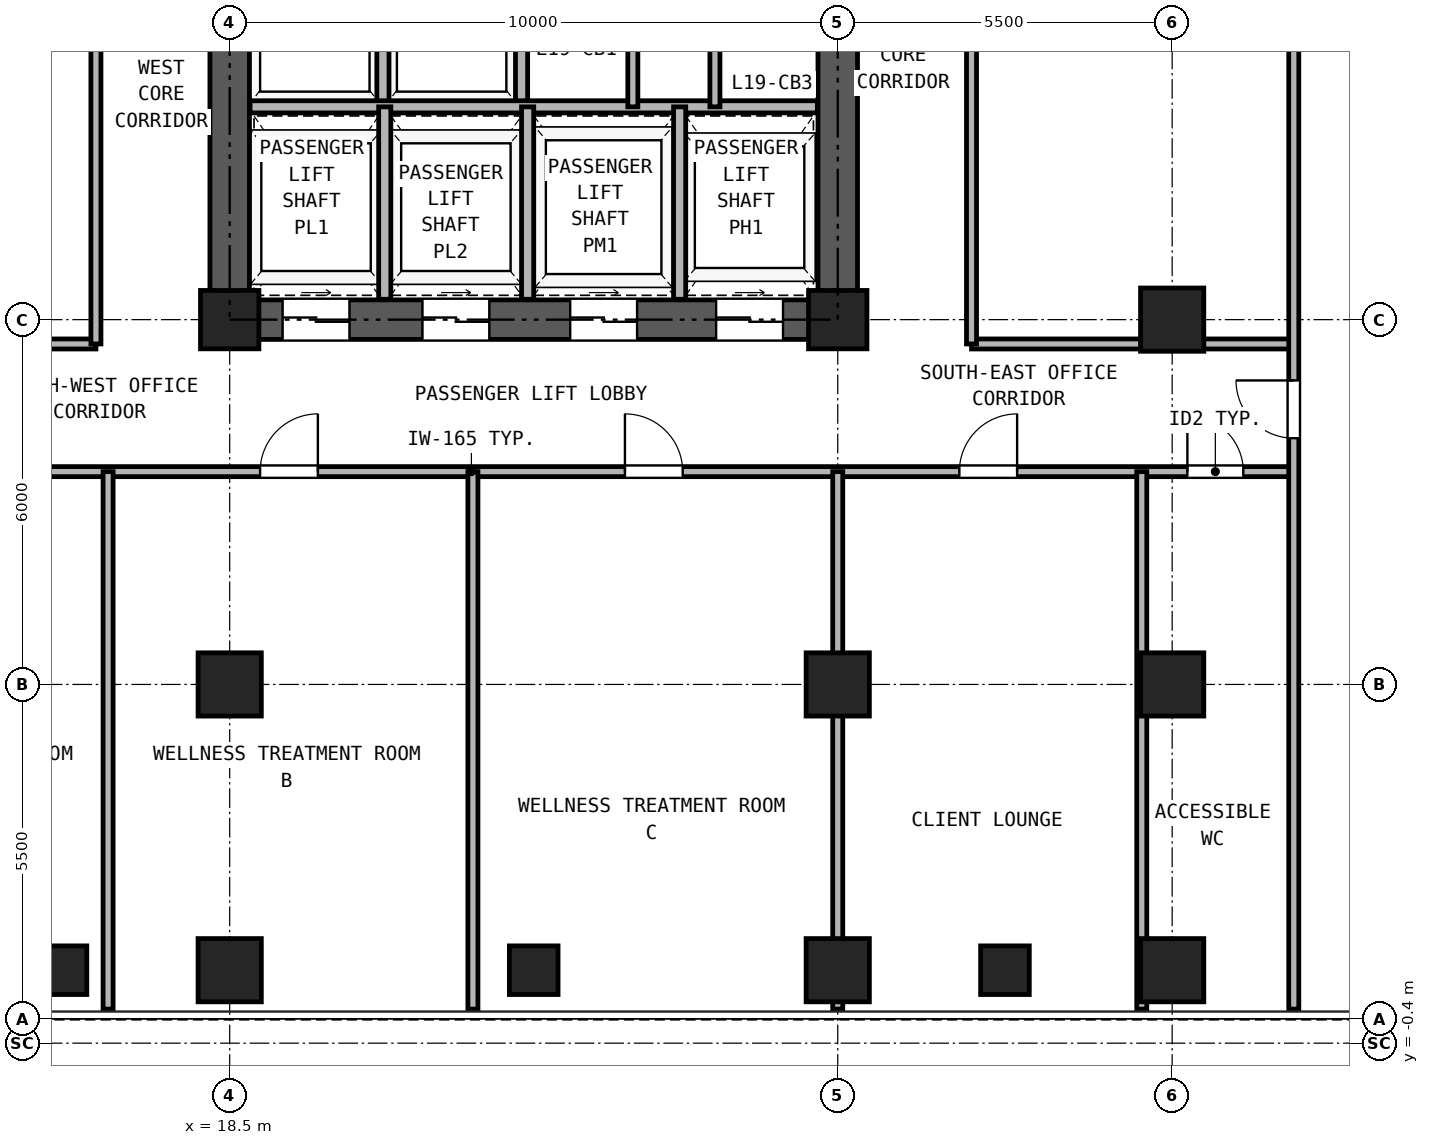
"""IFC4 building model, lengths in metres.
Left out: names, types, materials, properties, quantities, classifications, styles, units other than length and angle.
Written with IfcOpenShell. Run it as: python <this file> out.ifc"""

import sys

from ifc_helpers import new_model, si_unit, direction, frame, frame_2d, origin, origin_2d, place, context, subcontext, project, spatial, rectangle, hollow_rectangle, extrude, source, transform, mapped, element, fill, save


model = new_model("IFC4")
c1 = context("Model", 3, precision=1e-05, world=origin(), true_north=direction((0.0, 1.0)))
c2 = subcontext(c1, "Body", "Model", "MODEL_VIEW")
j1 = project(units=[si_unit("LENGTHUNIT", "METRE"), si_unit("PLANEANGLEUNIT", "RADIAN")], contexts=[c1])
p1 = place(None, origin())
s1 = spatial("IfcSite", under=j1, at=p1, CompositionType="ELEMENT")
p2 = place(p1, origin())
s2 = spatial("IfcBuilding", under=s1, at=p2, CompositionType="ELEMENT")
p3 = place(p2, frame((0.0, 0.0, 72.9)))
s3 = spatial("IfcBuildingStorey", under=s2, at=p3, CompositionType="ELEMENT", Elevation=72.9)
m1 = source(origin(), c2, "Body", "SweptSolid", [
    extrude(hollow_rectangle(XDim=1.04, YDim=1.04, WallThickness=0.065, at=origin_2d()), origin(), (0.0, 0.0, 1.0), 3.24),
])
for number, where, z_axis, x_axis in (
    (1, (18.5, 0.8, 0.0), (0.0, 0.0, 1.0), (1.0, 0.0, 0.0)),
    (2, (28.5, 0.8, 0.0), (0.0, 0.0, 1.0), (1.0, 0.0, 0.0)),
    (3, (34.0, 0.8, 0.0), (0.0, 0.0, 1.0), (1.0, 0.0, 0.0)),
    (4, (18.5, 5.5, 0.0), (0.0, 0.0, 1.0), (1.0, 0.0, 0.0)),
):
    element("IfcColumn", number, at=place(p3, frame(where, z_axis=z_axis, x_axis=x_axis)), inside=s3, PredefinedType="COLUMN", context=c2, shape_type="MappedRepresentation", body=[
        mapped(m1, transform((0.0, 0.0, 0.0), x_axis=(1.0, 0.0, 0.0), y_axis=(0.0, 1.0, 0.0), z_axis=(0.0, 0.0, 1.0), scale=1.0)),
    ])
m2 = source(origin(), c2, "Body", "SweptSolid", [
    extrude(hollow_rectangle(XDim=0.96, YDim=0.96, WallThickness=0.06, at=origin_2d()), origin(), (0.0, 0.0, 1.0), 3.24),
])
p4 = place(p3, frame((18.5, 11.5, 0.0), z_axis=(0.0, 0.0, 1.0), x_axis=(1.0, 0.0, 0.0)))
e5 = element("IfcColumn", 5, at=p4, inside=s3, PredefinedType="COLUMN", context=c2, shape_type="MappedRepresentation", body=[
    mapped(m2, transform((0.0, 0.0, 0.0), x_axis=(1.0, 0.0, 0.0), y_axis=(0.0, 1.0, 0.0), z_axis=(0.0, 0.0, 1.0), scale=1.0)),
])
p5 = place(p3, frame((28.5, 5.5, 0.0), z_axis=(0.0, 0.0, 1.0), x_axis=(1.0, 0.0, 0.0)))
e6 = element("IfcColumn", 6, at=p5, inside=s3, PredefinedType="COLUMN", context=c2, shape_type="MappedRepresentation", body=[
    mapped(m1, transform((0.0, 0.0, 0.0), x_axis=(1.0, 0.0, 0.0), y_axis=(0.0, 1.0, 0.0), z_axis=(0.0, 0.0, 1.0), scale=1.0)),
])
p6 = place(p3, frame((28.5, 11.5, 0.0), z_axis=(0.0, 0.0, 1.0), x_axis=(1.0, 0.0, 0.0)))
e7 = element("IfcColumn", 7, at=p6, inside=s3, PredefinedType="COLUMN", context=c2, shape_type="MappedRepresentation", body=[
    mapped(m2, transform((0.0, 0.0, 0.0), x_axis=(1.0, 0.0, 0.0), y_axis=(0.0, 1.0, 0.0), z_axis=(0.0, 0.0, 1.0), scale=1.0)),
])
for number, where, z_axis, x_axis in (
    (8, (34.0, 5.5, 0.0), (0.0, 0.0, 1.0), (1.0, 0.0, 0.0)),
    (9, (34.0, 11.5, 0.0), (0.0, 0.0, 1.0), (1.0, 0.0, 0.0)),
):
    element("IfcColumn", number, at=place(p3, frame(where, z_axis=z_axis, x_axis=x_axis)), inside=s3, PredefinedType="COLUMN", context=c2, shape_type="MappedRepresentation", body=[
        mapped(m1, transform((0.0, 0.0, 0.0), x_axis=(1.0, 0.0, 0.0), y_axis=(0.0, 1.0, 0.0), z_axis=(0.0, 0.0, 1.0), scale=1.0)),
    ])
m3 = source(origin(), c2, "Body", "SweptSolid", [
    extrude(hollow_rectangle(XDim=0.8, YDim=0.8, WallThickness=0.045, at=origin_2d()), origin(), (0.0, 0.0, 1.0), 3.24),
])
for number, where, z_axis, x_axis in (
    (10, (15.75, 0.8, 0.0), (0.0, 0.0, 1.0), (1.0, 0.0, 0.0)),
    (11, (23.5, 0.8, 0.0), (0.0, 0.0, 1.0), (1.0, 0.0, 0.0)),
    (12, (31.25, 0.8, 0.0), (0.0, 0.0, 1.0), (1.0, 0.0, 0.0)),
):
    element("IfcColumn", number, at=place(p3, frame(where, z_axis=z_axis, x_axis=x_axis)), inside=s3, PredefinedType="COLUMN", context=c2, shape_type="MappedRepresentation", body=[
        mapped(m3, transform((0.0, 0.0, 0.0), x_axis=(1.0, 0.0, 0.0), y_axis=(0.0, 1.0, 0.0), z_axis=(0.0, 0.0, 1.0), scale=1.0)),
    ])
p7 = place(p3, frame((18.175, 11.5, 0.0), z_axis=(0.0, 0.0, 1.0), x_axis=(1.0, 0.0, 0.0)))
e13 = element("IfcWall", 13, at=p7, inside=s3, PredefinedType="SHEAR", context=c2, shape_type="SweptSolid", body=[
    extrude(rectangle(XDim=10.65, YDim=0.65, at=frame_2d((5.325, 0.0))), origin(), (0.0, 0.0, 1.0), 3.24),
])
p8 = place(p7, frame((1.195, 0.0, 0.0)))
e14 = element("IfcOpeningElement", 14, at=p8, cuts=e13, PredefinedType="OPENING", context=c2, shape_type="SweptSolid", body=[
    extrude(rectangle(XDim=1.1, YDim=2.25, at=frame_2d((0.55, 1.125))), frame((0.0, 0.335, 0.0), z_axis=(0.0, -1.0, 0.0), x_axis=(1.0, 0.0, 0.0)), (0.0, 0.0, 1.0), 0.67),
])
p9 = place(p7, frame((3.495, 0.0, 0.0)))
e15 = element("IfcOpeningElement", 15, at=p9, cuts=e13, PredefinedType="OPENING", context=c2, shape_type="SweptSolid", body=[
    extrude(rectangle(XDim=1.1, YDim=2.25, at=frame_2d((0.55, 1.125))), frame((0.0, 0.335, 0.0), z_axis=(0.0, -1.0, 0.0), x_axis=(1.0, 0.0, 0.0)), (0.0, 0.0, 1.0), 0.67),
])
p10 = place(p7, frame((5.925, 0.0, 0.0)))
e16 = element("IfcOpeningElement", 16, at=p10, cuts=e13, PredefinedType="OPENING", context=c2, shape_type="SweptSolid", body=[
    extrude(rectangle(XDim=1.1, YDim=2.25, at=frame_2d((0.55, 1.125))), frame((0.0, 0.335, 0.0), z_axis=(0.0, -1.0, 0.0), x_axis=(1.0, 0.0, 0.0)), (0.0, 0.0, 1.0), 0.67),
])
p11 = place(p7, frame((8.325, 0.0, 0.0)))
e17 = element("IfcOpeningElement", 17, at=p11, cuts=e13, PredefinedType="OPENING", context=c2, shape_type="SweptSolid", body=[
    extrude(rectangle(XDim=1.1, YDim=2.25, at=frame_2d((0.55, 1.125))), frame((0.0, 0.335, 0.0), z_axis=(0.0, -1.0, 0.0), x_axis=(1.0, 0.0, 0.0)), (0.0, 0.0, 1.0), 0.67),
])
p12 = place(p3, frame((18.5, 11.825, 0.0), z_axis=(0.0, 0.0, 1.0), x_axis=(0.0, 1.0, 0.0)))
e18 = element("IfcWall", 18, at=p12, inside=s3, PredefinedType="SHEAR", context=c2, shape_type="SweptSolid", body=[
    extrude(rectangle(XDim=16.6, YDim=0.65, at=frame_2d((8.3, 0.0))), origin(), (0.0, 0.0, 1.0), 3.24),
])
p13 = place(p12, frame((7.325, 0.0, 0.0)))
e19 = element("IfcOpeningElement", 19, at=p13, cuts=e18, PredefinedType="OPENING", context=c2, shape_type="SweptSolid", body=[
    extrude(rectangle(XDim=1.15, YDim=2.2, at=frame_2d((0.575, 1.1))), frame((0.0, 0.335, 0.0), z_axis=(0.0, -1.0, 0.0), x_axis=(1.0, 0.0, 0.0)), (0.0, 0.0, 1.0), 0.67),
])
p14 = place(p3, frame((28.5, 11.825, 0.0), z_axis=(0.0, 0.0, 1.0), x_axis=(0.0, 1.0, 0.0)))
e20 = element("IfcWall", 20, at=p14, inside=s3, PredefinedType="SHEAR", context=c2, shape_type="SweptSolid", body=[
    extrude(rectangle(XDim=16.6, YDim=0.65, at=frame_2d((8.3, 0.0))), origin(), (0.0, 0.0, 1.0), 3.24),
])
p15 = place(p14, frame((7.325, 0.0, 0.0)))
e21 = element("IfcOpeningElement", 21, at=p15, cuts=e20, PredefinedType="OPENING", context=c2, shape_type="SweptSolid", body=[
    extrude(rectangle(XDim=1.15, YDim=2.2, at=frame_2d((0.575, 1.1))), frame((0.0, 0.335, 0.0), z_axis=(0.0, -1.0, 0.0), x_axis=(1.0, 0.0, 0.0)), (0.0, 0.0, 1.0), 0.67),
])
for number, where, z_axis, x_axis in (
    (22, (21.02, 15.0, 0.0), (0.0, 0.0, 1.0), (0.0, 1.0, 0.0)),
    (23, (23.3, 15.0, 0.0), (0.0, 0.0, 1.0), (0.0, 1.0, 0.0)),
):
    element("IfcWall", number, at=place(p3, frame(where, z_axis=z_axis, x_axis=x_axis)), inside=s3, PredefinedType="PARTITIONING", context=c2, shape_type="SweptSolid", body=[
        extrude(rectangle(XDim=3.0, YDim=0.2, at=frame_2d((1.5, 0.0))), origin(), (0.0, 0.0, 1.0), 3.24),
    ])
p16 = place(p3, frame((18.835, 15.0, 0.0), z_axis=(0.0, 0.0, 1.0), x_axis=(1.0, 0.0, 0.0)))
e24 = element("IfcWall", 24, at=p16, inside=s3, PredefinedType="PARTITIONING", context=c2, shape_type="SweptSolid", body=[
    extrude(rectangle(XDim=9.33, YDim=0.2, at=frame_2d((4.665, 0.0))), origin(), (0.0, 0.0, 1.0), 3.24),
])
p17 = place(p3, frame((25.13, 15.0, 0.0), z_axis=(0.0, 0.0, 1.0), x_axis=(0.0, 1.0, 0.0)))
e25 = element("IfcWall", 25, at=p17, inside=s3, PredefinedType="PARTITIONING", context=c2, shape_type="SweptSolid", body=[
    extrude(rectangle(XDim=3.0, YDim=0.165, at=frame_2d((1.5, 0.0))), origin(), (0.0, 0.0, 1.0), 3.24),
])
p18 = place(p3, frame((26.48, 15.0, 0.0), z_axis=(0.0, 0.0, 1.0), x_axis=(0.0, 1.0, 0.0)))
e26 = element("IfcWall", 26, at=p18, inside=s3, PredefinedType="PARTITIONING", context=c2, shape_type="SweptSolid", body=[
    extrude(rectangle(XDim=3.0, YDim=0.165, at=frame_2d((1.5, 0.0))), origin(), (0.0, 0.0, 1.0), 3.24),
])
p19 = place(p18, frame((1.05, 0.0, 0.0)))
e27 = element("IfcOpeningElement", 27, at=p19, cuts=e26, PredefinedType="OPENING", context=c2, shape_type="SweptSolid", body=[
    extrude(rectangle(XDim=0.9, YDim=2.05, at=frame_2d((0.45, 1.025))), frame((0.0, 0.093, 0.0), z_axis=(0.0, -1.0, 0.0), x_axis=(1.0, 0.0, 0.0)), (0.0, 0.0, 1.0), 0.185),
])
for number, where, z_axis, x_axis in (
    (28, (21.05, 11.835, 0.0), (0.0, 0.0, 1.0), (0.0, 1.0, 0.0)),
    (29, (23.4, 11.835, 0.0), (0.0, 0.0, 1.0), (0.0, 1.0, 0.0)),
    (30, (25.9, 11.835, 0.0), (0.0, 0.0, 1.0), (0.0, 1.0, 0.0)),
):
    element("IfcWall", number, at=place(p3, frame(where, z_axis=z_axis, x_axis=x_axis)), inside=s3, PredefinedType="PARTITIONING", context=c2, shape_type="SweptSolid", body=[
        extrude(rectangle(XDim=3.165, YDim=0.2, at=frame_2d((1.583, 0.0))), origin(), (0.0, 0.0, 1.0), 3.24),
    ])
p20 = place(p3, frame((11.0, 9.0, 0.0), z_axis=(0.0, 0.0, 1.0), x_axis=(1.0, 0.0, 0.0)))
e31 = element("IfcWall", 31, at=p20, inside=s3, PredefinedType="PARTITIONING", context=c2, shape_type="SweptSolid", body=[
    extrude(rectangle(XDim=25.0, YDim=0.165, at=frame_2d((12.5, 0.0))), origin(), (0.0, 0.0, 1.0), 3.24),
])
p21 = place(p20, frame((2.25, 0.0, 0.0)))
e32 = element("IfcOpeningElement", 32, at=p21, cuts=e31, PredefinedType="OPENING", context=c2, shape_type="SweptSolid", body=[
    extrude(rectangle(XDim=0.95, YDim=2.15, at=frame_2d((0.475, 1.075))), frame((0.0, 0.093, 0.0), z_axis=(0.0, -1.0, 0.0), x_axis=(1.0, 0.0, 0.0)), (0.0, 0.0, 1.0), 0.185),
])
p22 = place(p20, frame((8.0, 0.0, 0.0)))
e33 = element("IfcOpeningElement", 33, at=p22, cuts=e31, PredefinedType="OPENING", context=c2, shape_type="SweptSolid", body=[
    extrude(rectangle(XDim=0.95, YDim=2.15, at=frame_2d((0.475, 1.075))), frame((0.0, 0.093, 0.0), z_axis=(0.0, -1.0, 0.0), x_axis=(1.0, 0.0, 0.0)), (0.0, 0.0, 1.0), 0.185),
])
p23 = place(p20, frame((14.0, 0.0, 0.0)))
e34 = element("IfcOpeningElement", 34, at=p23, cuts=e31, PredefinedType="OPENING", context=c2, shape_type="SweptSolid", body=[
    extrude(rectangle(XDim=0.95, YDim=2.15, at=frame_2d((0.475, 1.075))), frame((0.0, 0.093, 0.0), z_axis=(0.0, -1.0, 0.0), x_axis=(1.0, 0.0, 0.0)), (0.0, 0.0, 1.0), 0.185),
])
p24 = place(p20, frame((19.5, 0.0, 0.0)))
e35 = element("IfcOpeningElement", 35, at=p24, cuts=e31, PredefinedType="OPENING", context=c2, shape_type="SweptSolid", body=[
    extrude(rectangle(XDim=0.95, YDim=2.15, at=frame_2d((0.475, 1.075))), frame((0.0, 0.093, 0.0), z_axis=(0.0, -1.0, 0.0), x_axis=(1.0, 0.0, 0.0)), (0.0, 0.0, 1.0), 0.185),
])
p25 = place(p20, frame((23.25, 0.0, 0.0)))
e36 = element("IfcOpeningElement", 36, at=p25, cuts=e31, PredefinedType="OPENING", context=c2, shape_type="SweptSolid", body=[
    extrude(rectangle(XDim=0.92, YDim=2.1, at=frame_2d((0.46, 1.05))), frame((0.0, 0.093, 0.0), z_axis=(0.0, -1.0, 0.0), x_axis=(1.0, 0.0, 0.0)), (0.0, 0.0, 1.0), 0.185),
])
for number, where, z_axis, x_axis in (
    (37, (11.0, 11.1, 0.0), (0.0, 0.0, 1.0), (1.0, 0.0, 0.0)),
    (38, (30.7, 11.1, 0.0), (0.0, 0.0, 1.0), (1.0, 0.0, 0.0)),
):
    element("IfcWall", number, at=place(p3, frame(where, z_axis=z_axis, x_axis=x_axis)), inside=s3, PredefinedType="PARTITIONING", context=c2, shape_type="SweptSolid", body=[
        extrude(rectangle(XDim=5.3, YDim=0.165, at=frame_2d((2.65, 0.0))), origin(), (0.0, 0.0, 1.0), 3.24),
    ])
p26 = place(p3, frame((16.3, 11.1, 0.0), z_axis=(0.0, 0.0, 1.0), x_axis=(0.0, 1.0, 0.0)))
e39 = element("IfcWall", 39, at=p26, inside=s3, PredefinedType="PARTITIONING", context=c2, shape_type="SweptSolid", body=[
    extrude(rectangle(XDim=18.1, YDim=0.165, at=frame_2d((9.05, 0.0))), origin(), (0.0, 0.0, 1.0), 3.24),
])
p27 = place(p26, frame((5.363, 0.0, 0.0)))
e40 = element("IfcOpeningElement", 40, at=p27, cuts=e39, PredefinedType="OPENING", context=c2, shape_type="SweptSolid", body=[
    extrude(rectangle(XDim=0.95, YDim=2.15, at=frame_2d((0.475, 1.075))), frame((0.0, 0.093, 0.0), z_axis=(0.0, -1.0, 0.0), x_axis=(1.0, 0.0, 0.0)), (0.0, 0.0, 1.0), 0.185),
])
p28 = place(p26, frame((14.413, 0.0, 0.0)))
e41 = element("IfcOpeningElement", 41, at=p28, cuts=e39, PredefinedType="OPENING", context=c2, shape_type="SweptSolid", body=[
    extrude(rectangle(XDim=0.95, YDim=2.15, at=frame_2d((0.475, 1.075))), frame((0.0, 0.093, 0.0), z_axis=(0.0, -1.0, 0.0), x_axis=(1.0, 0.0, 0.0)), (0.0, 0.0, 1.0), 0.185),
])
p29 = place(p3, frame((30.7, 11.1, 0.0), z_axis=(0.0, 0.0, 1.0), x_axis=(0.0, 1.0, 0.0)))
e42 = element("IfcWall", 42, at=p29, inside=s3, PredefinedType="PARTITIONING", context=c2, shape_type="SweptSolid", body=[
    extrude(rectangle(XDim=18.1, YDim=0.165, at=frame_2d((9.05, 0.0))), origin(), (0.0, 0.0, 1.0), 3.24),
])
p30 = place(p29, frame((8.55, 0.0, 0.0)))
e43 = element("IfcOpeningElement", 43, at=p30, cuts=e42, PredefinedType="OPENING", context=c2, shape_type="SweptSolid", body=[
    extrude(rectangle(XDim=0.95, YDim=2.15, at=frame_2d((0.475, 1.075))), frame((0.0, 0.093, 0.0), z_axis=(0.0, -1.0, 0.0), x_axis=(1.0, 0.0, 0.0)), (0.0, 0.0, 1.0), 0.185),
])
p31 = place(p3, frame((36.0, 0.16, 0.0), z_axis=(0.0, 0.0, 1.0), x_axis=(0.0, 1.0, 0.0)))
e44 = element("IfcWall", 44, at=p31, inside=s3, PredefinedType="PARTITIONING", context=c2, shape_type="SweptSolid", body=[
    extrude(rectangle(XDim=40.18, YDim=0.165, at=frame_2d((20.09, 0.0))), origin(), (0.0, 0.0, 1.0), 3.24),
])
p32 = place(p31, frame((9.39, 0.0, 0.0)))
e45 = element("IfcOpeningElement", 45, at=p32, cuts=e44, PredefinedType="OPENING", context=c2, shape_type="SweptSolid", body=[
    extrude(rectangle(XDim=0.95, YDim=2.15, at=frame_2d((0.475, 1.075))), frame((0.0, 0.093, 0.0), z_axis=(0.0, -1.0, 0.0), x_axis=(1.0, 0.0, 0.0)), (0.0, 0.0, 1.0), 0.185),
])
p33 = place(p31, frame((29.59, 0.0, 0.0)))
e46 = element("IfcOpeningElement", 46, at=p33, cuts=e44, PredefinedType="OPENING", context=c2, shape_type="SweptSolid", body=[
    extrude(rectangle(XDim=0.95, YDim=2.15, at=frame_2d((0.475, 1.075))), frame((0.0, 0.093, 0.0), z_axis=(0.0, -1.0, 0.0), x_axis=(1.0, 0.0, 0.0)), (0.0, 0.0, 1.0), 0.185),
])
for number, where, z_axis, x_axis in (
    (47, (16.5, 0.16, 0.0), (0.0, 0.0, 1.0), (0.0, 1.0, 0.0)),
    (48, (22.5, 0.16, 0.0), (0.0, 0.0, 1.0), (0.0, 1.0, 0.0)),
):
    element("IfcWall", number, at=place(p3, frame(where, z_axis=z_axis, x_axis=x_axis)), inside=s3, PredefinedType="PARTITIONING", context=c2, shape_type="SweptSolid", body=[
        extrude(rectangle(XDim=8.84, YDim=0.165, at=frame_2d((4.42, 0.0))), origin(), (0.0, 0.0, 1.0), 3.24),
    ])
p34 = place(p3, frame((28.5, 0.16, 0.0), z_axis=(0.0, 0.0, 1.0), x_axis=(0.0, 1.0, 0.0)))
e49 = element("IfcWall", 49, at=p34, inside=s3, PredefinedType="PARTITIONING", context=c2, shape_type="SweptSolid", body=[
    extrude(rectangle(XDim=8.84, YDim=0.165, at=frame_2d((4.42, 0.0))), origin(), (0.0, 0.0, 1.0), 2.459),
])
p35 = place(p3, frame((33.5, 0.16, 0.0), z_axis=(0.0, 0.0, 1.0), x_axis=(0.0, 1.0, 0.0)))
e50 = element("IfcWall", 50, at=p35, inside=s3, PredefinedType="PARTITIONING", context=c2, shape_type="SweptSolid", body=[
    extrude(rectangle(XDim=8.84, YDim=0.165, at=frame_2d((4.42, 0.0))), origin(), (0.0, 0.0, 1.0), 3.24),
])
p36 = place(p8, frame((1.1, 0.0, 0.0), z_axis=(0.0, 0.0, 1.0), x_axis=(-1.0, 0.0, 0.0)))
e51 = element("IfcDoor", 51, at=p36, inside=s3, OperationType="DOUBLE_DOOR_SLIDING", PredefinedType="DOOR", context=c2, shape_type="SweptSolid", body=[
    extrude(rectangle(XDim=1.1, YDim=2.25, at=frame_2d((0.55, 1.125))), frame((0.0, 0.025, 0.0), z_axis=(0.0, -1.0, 0.0), x_axis=(1.0, 0.0, 0.0)), (0.0, 0.0, 1.0), 0.05),
])
fill(e14, e51)
p37 = place(p9, frame((1.1, 0.0, 0.0), z_axis=(0.0, 0.0, 1.0), x_axis=(-1.0, 0.0, 0.0)))
e52 = element("IfcDoor", 52, at=p37, inside=s3, OperationType="DOUBLE_DOOR_SLIDING", PredefinedType="DOOR", context=c2, shape_type="SweptSolid", body=[
    extrude(rectangle(XDim=1.1, YDim=2.25, at=frame_2d((0.55, 1.125))), frame((0.0, 0.025, 0.0), z_axis=(0.0, -1.0, 0.0), x_axis=(1.0, 0.0, 0.0)), (0.0, 0.0, 1.0), 0.05),
])
fill(e15, e52)
p38 = place(p10, frame((1.1, 0.0, 0.0), z_axis=(0.0, 0.0, 1.0), x_axis=(-1.0, 0.0, 0.0)))
e53 = element("IfcDoor", 53, at=p38, inside=s3, OperationType="DOUBLE_DOOR_SLIDING", PredefinedType="DOOR", context=c2, shape_type="SweptSolid", body=[
    extrude(rectangle(XDim=1.1, YDim=2.25, at=frame_2d((0.55, 1.125))), frame((0.0, 0.025, 0.0), z_axis=(0.0, -1.0, 0.0), x_axis=(1.0, 0.0, 0.0)), (0.0, 0.0, 1.0), 0.05),
])
fill(e16, e53)
p39 = place(p11, frame((1.1, 0.0, 0.0), z_axis=(0.0, 0.0, 1.0), x_axis=(-1.0, 0.0, 0.0)))
e54 = element("IfcDoor", 54, at=p39, inside=s3, OperationType="DOUBLE_DOOR_SLIDING", PredefinedType="DOOR", context=c2, shape_type="SweptSolid", body=[
    extrude(rectangle(XDim=1.1, YDim=2.25, at=frame_2d((0.55, 1.125))), frame((0.0, 0.025, 0.0), z_axis=(0.0, -1.0, 0.0), x_axis=(1.0, 0.0, 0.0)), (0.0, 0.0, 1.0), 0.05),
])
fill(e17, e54)
p40 = place(p22, frame((0.95, 0.0, 0.0), z_axis=(0.0, 0.0, 1.0), x_axis=(-1.0, 0.0, 0.0)))
e55 = element("IfcDoor", 55, at=p40, inside=s3, OperationType="SINGLE_SWING_RIGHT", PredefinedType="DOOR", context=c2, shape_type="SweptSolid", body=[
    extrude(rectangle(XDim=0.95, YDim=2.15, at=frame_2d((0.475, 1.075))), frame((0.0, 0.025, 0.0), z_axis=(0.0, -1.0, 0.0), x_axis=(1.0, 0.0, 0.0)), (0.0, 0.0, 1.0), 0.05),
])
fill(e33, e55)
p41 = place(p23, frame((0.95, 0.0, 0.0), z_axis=(0.0, 0.0, 1.0), x_axis=(-1.0, 0.0, 0.0)))
e56 = element("IfcDoor", 56, at=p41, inside=s3, OperationType="SINGLE_SWING_LEFT", PredefinedType="DOOR", context=c2, shape_type="SweptSolid", body=[
    extrude(rectangle(XDim=0.95, YDim=2.15, at=frame_2d((0.475, 1.075))), frame((0.0, 0.025, 0.0), z_axis=(0.0, -1.0, 0.0), x_axis=(1.0, 0.0, 0.0)), (0.0, 0.0, 1.0), 0.05),
])
fill(e34, e56)
p42 = place(p24, frame((0.95, 0.0, 0.0), z_axis=(0.0, 0.0, 1.0), x_axis=(-1.0, 0.0, 0.0)))
e57 = element("IfcDoor", 57, at=p42, inside=s3, OperationType="SINGLE_SWING_RIGHT", PredefinedType="DOOR", context=c2, shape_type="SweptSolid", body=[
    extrude(rectangle(XDim=0.95, YDim=2.15, at=frame_2d((0.475, 1.075))), frame((0.0, 0.025, 0.0), z_axis=(0.0, -1.0, 0.0), x_axis=(1.0, 0.0, 0.0)), (0.0, 0.0, 1.0), 0.05),
])
fill(e35, e57)
p43 = place(p25, frame((0.92, 0.0, 0.0), z_axis=(0.0, 0.0, 1.0), x_axis=(-1.0, 0.0, 0.0)))
e58 = element("IfcDoor", 58, at=p43, inside=s3, OperationType="SINGLE_SWING_LEFT", PredefinedType="DOOR", context=c2, shape_type="SweptSolid", body=[
    extrude(rectangle(XDim=0.92, YDim=2.1, at=frame_2d((0.46, 1.05))), frame((0.0, 0.025, 0.0), z_axis=(0.0, -1.0, 0.0), x_axis=(1.0, 0.0, 0.0)), (0.0, 0.0, 1.0), 0.05),
])
fill(e36, e58)
p44 = place(p32, origin())
e59 = element("IfcDoor", 59, at=p44, inside=s3, OperationType="SINGLE_SWING_RIGHT", PredefinedType="DOOR", context=c2, shape_type="SweptSolid", body=[
    extrude(rectangle(XDim=0.95, YDim=2.15, at=frame_2d((0.475, 1.075))), frame((0.0, 0.025, 0.0), z_axis=(0.0, -1.0, 0.0), x_axis=(1.0, 0.0, 0.0)), (0.0, 0.0, 1.0), 0.05),
])
fill(e45, e59)
save(model, sys.argv[1])
